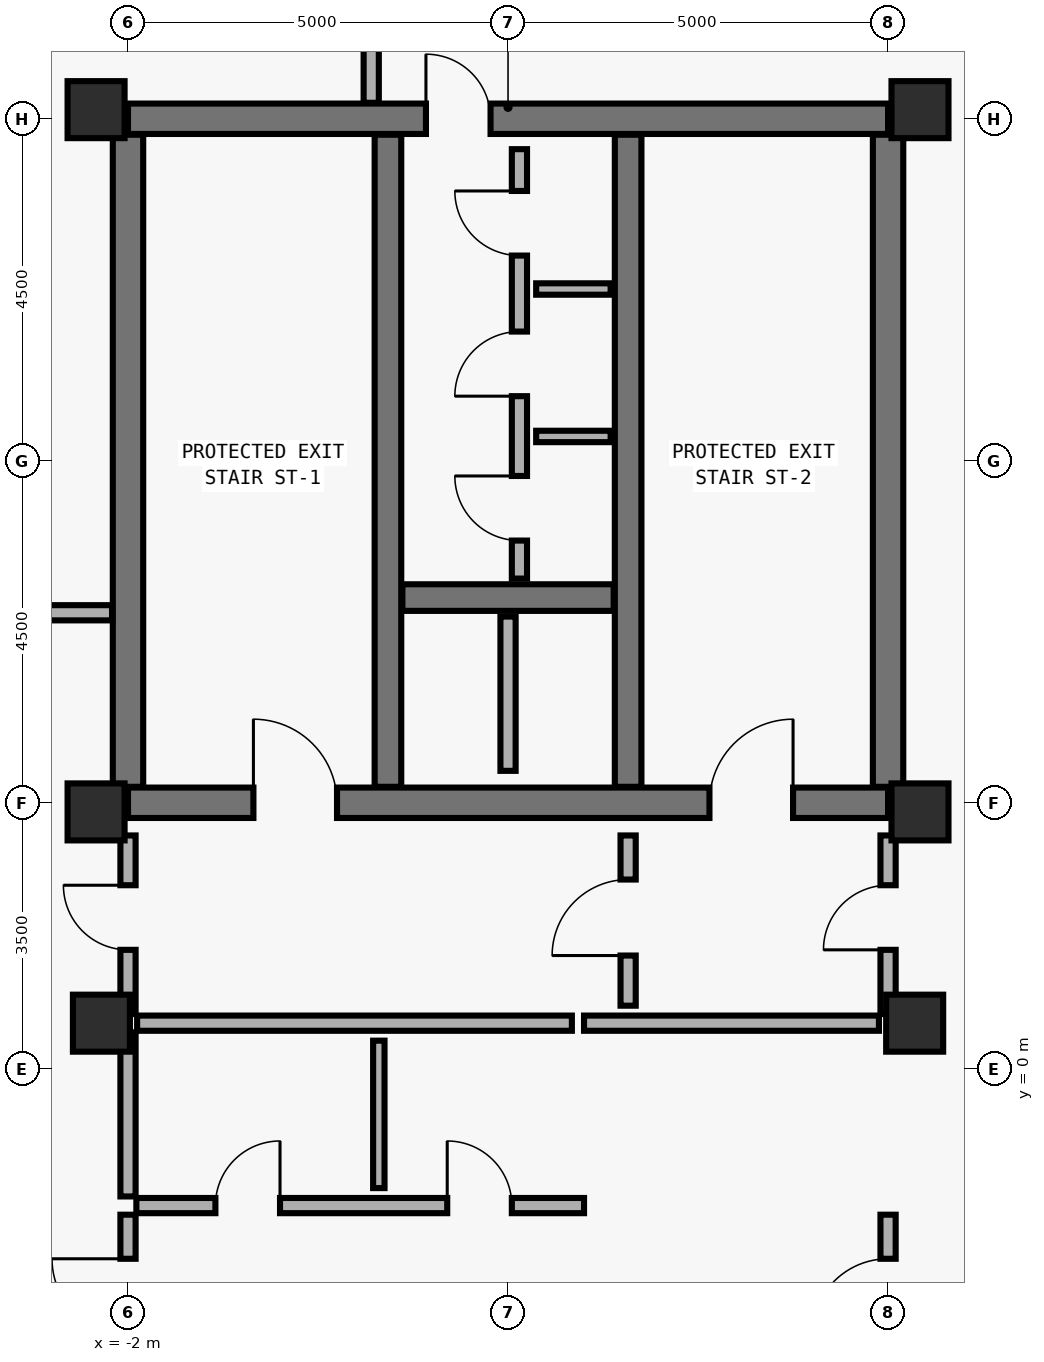
"""IFC4 building model, lengths in metres.
Left out: names, types, materials, properties, quantities, classifications, styles, units other than length and angle.
Written with IfcOpenShell. Run it as: python <this file> out.ifc"""

import sys

from ifc_helpers import new_model, si_unit, direction, frame, frame_2d, origin, origin_2d, place, context, subcontext, project, spatial, rectangle, extrude, element, fill, save


model = new_model("IFC4")
c1 = context("Model", 3, precision=1e-05, world=origin(), true_north=direction((0.0, 1.0)))
c2 = subcontext(c1, "Body", "Model", "MODEL_VIEW")
j1 = project(units=[si_unit("LENGTHUNIT", "METRE"), si_unit("PLANEANGLEUNIT", "RADIAN")], contexts=[c1])
p1 = place(None, origin())
s1 = spatial("IfcSite", under=j1, at=p1, CompositionType="ELEMENT")
p2 = place(p1, origin())
s2 = spatial("IfcBuilding", under=s1, at=p2, CompositionType="ELEMENT")
p3 = place(p2, frame((0.0, 0.0, 294.0)))
s3 = spatial("IfcBuildingStorey", under=s2, at=p3, CompositionType="ELEMENT", Elevation=294.0)
p4 = place(p3, frame((-2.0, 3.5, 0.0), z_axis=(0.0, 0.0, 1.0), x_axis=(1.0, 0.0, 0.0)))
e1 = element("IfcWall", 1, at=p4, inside=s3, PredefinedType="SHEAR", context=c2, shape_type="SweptSolid", body=[
    extrude(rectangle(XDim=10.0, YDim=0.4, at=frame_2d((5.0, 0.0))), origin(), (0.0, 0.0, 1.0), 4.192),
])
p5 = place(p4, frame((1.65, 0.0, 0.0)))
e2 = element("IfcOpeningElement", 2, at=p5, cuts=e1, PredefinedType="OPENING", context=c2, shape_type="SweptSolid", body=[
    extrude(rectangle(XDim=1.1, YDim=2.15, at=frame_2d((0.55, 1.075))), frame((0.0, 0.21, 0.0), z_axis=(0.0, -1.0, 0.0), x_axis=(1.0, 0.0, 0.0)), (0.0, 0.0, 1.0), 0.42),
])
p6 = place(p4, frame((7.65, 0.0, 0.0)))
e3 = element("IfcOpeningElement", 3, at=p6, cuts=e1, PredefinedType="OPENING", context=c2, shape_type="SweptSolid", body=[
    extrude(rectangle(XDim=1.1, YDim=2.15, at=frame_2d((0.55, 1.075))), frame((0.0, 0.21, 0.0), z_axis=(0.0, -1.0, 0.0), x_axis=(1.0, 0.0, 0.0)), (0.0, 0.0, 1.0), 0.42),
])
p7 = place(p3, frame((-2.0, 12.5, 0.0), z_axis=(0.0, 0.0, 1.0), x_axis=(1.0, 0.0, 0.0)))
e4 = element("IfcWall", 4, at=p7, inside=s3, PredefinedType="SHEAR", context=c2, shape_type="SweptSolid", body=[
    extrude(rectangle(XDim=10.0, YDim=0.4, at=frame_2d((5.0, 0.0))), origin(), (0.0, 0.0, 1.0), 4.192),
])
p8 = place(p7, frame((3.92, 0.0, 0.0)))
e5 = element("IfcOpeningElement", 5, at=p8, cuts=e4, PredefinedType="OPENING", context=c2, shape_type="SweptSolid", body=[
    extrude(rectangle(XDim=0.85, YDim=2.1, at=frame_2d((0.425, 1.05))), frame((0.0, 0.21, 0.0), z_axis=(0.0, -1.0, 0.0), x_axis=(1.0, 0.0, 0.0)), (0.0, 0.0, 1.0), 0.42),
])
for number, where, z_axis, x_axis in (
    (6, (-2.0, 3.71, 0.0), (0.0, 0.0, 1.0), (0.0, 1.0, 0.0)),
    (7, (8.0, 3.71, 0.0), (0.0, 0.0, 1.0), (0.0, 1.0, 0.0)),
):
    element("IfcWall", number, at=place(p3, frame(where, z_axis=z_axis, x_axis=x_axis)), inside=s3, PredefinedType="SHEAR", context=c2, shape_type="SweptSolid", body=[
        extrude(rectangle(XDim=8.58, YDim=0.4, at=frame_2d((4.29, 0.0))), origin(), (0.0, 0.0, 1.0), 4.192),
    ])
for number, where, z_axis, x_axis in (
    (8, (1.42, 3.71, 0.0), (0.0, 0.0, 1.0), (0.0, 1.0, 0.0)),
    (9, (4.58, 3.71, 0.0), (0.0, 0.0, 1.0), (0.0, 1.0, 0.0)),
):
    element("IfcWall", number, at=place(p3, frame(where, z_axis=z_axis, x_axis=x_axis)), inside=s3, PredefinedType="SHEAR", context=c2, shape_type="SweptSolid", body=[
        extrude(rectangle(XDim=8.58, YDim=0.35, at=frame_2d((4.29, 0.0))), origin(), (0.0, 0.0, 1.0), 4.192),
    ])
p9 = place(p3, frame((1.61, 6.2, 0.0), z_axis=(0.0, 0.0, 1.0), x_axis=(1.0, 0.0, 0.0)))
e10 = element("IfcWall", 10, at=p9, inside=s3, PredefinedType="SHEAR", context=c2, shape_type="SweptSolid", body=[
    extrude(rectangle(XDim=2.78, YDim=0.35, at=frame_2d((1.39, 0.0))), origin(), (0.0, 0.0, 1.0), 4.192),
])
for number, where, z_axis, x_axis in (
    (11, (-2.42, 12.62, 0.0), (0.0, 0.0, 1.0), (1.0, 0.0, 0.0)),
    (12, (8.42, 12.62, 0.0), (0.0, 0.0, 1.0), (1.0, 0.0, 0.0)),
    (13, (-2.42, 3.38, 0.0), (0.0, 0.0, 1.0), (1.0, 0.0, 0.0)),
    (14, (8.42, 3.38, 0.0), (0.0, 0.0, 1.0), (1.0, 0.0, 0.0)),
    (15, (-2.35, 0.6, 0.0), (0.0, 0.0, 1.0), (1.0, 0.0, 0.0)),
    (16, (8.35, 0.6, 0.0), (0.0, 0.0, 1.0), (1.0, 0.0, 0.0)),
):
    element("IfcColumn", number, at=place(p3, frame(where, z_axis=z_axis, x_axis=x_axis)), inside=s3, PredefinedType="COLUMN", context=c2, shape_type="SweptSolid", body=[
        extrude(rectangle(XDim=0.75, YDim=0.75, at=origin_2d()), origin(), (0.0, 0.0, 1.0), 4.175),
    ])
p10 = place(p3, frame((3.0, 3.92, 0.0), z_axis=(0.0, 0.0, 1.0), x_axis=(0.0, 1.0, 0.0)))
e17 = element("IfcWall", 17, at=p10, inside=s3, PredefinedType="SOLIDWALL", context=c2, shape_type="SweptSolid", body=[
    extrude(rectangle(XDim=2.03, YDim=0.2, at=frame_2d((1.015, 0.0))), origin(), (0.0, 0.0, 1.0), 3.96),
])
p11 = place(p3, frame((4.0, 0.6, 0.0), z_axis=(0.0, 0.0, 1.0), x_axis=(1.0, 0.0, 0.0)))
e18 = element("IfcWall", 18, at=p11, inside=s3, PredefinedType="SOLIDWALL", context=c2, shape_type="SweptSolid", body=[
    extrude(rectangle(XDim=3.88, YDim=0.2, at=frame_2d((1.94, 0.0))), origin(), (0.0, 0.0, 1.0), 3.672),
])
p12 = place(p3, frame((3.15, 6.45, 0.0), z_axis=(0.0, 0.0, 1.0), x_axis=(0.0, 1.0, 0.0)))
e19 = element("IfcWall", 19, at=p12, inside=s3, PredefinedType="MOVABLE", context=c2, shape_type="SweptSolid", body=[
    extrude(rectangle(XDim=5.65, YDim=0.2, at=frame_2d((2.825, 0.0))), origin(), (0.0, 0.0, 1.0), 3.96),
])
p13 = place(p12, frame((0.5, 0.0, 0.0)))
e20 = element("IfcOpeningElement", 20, at=p13, cuts=e19, PredefinedType="OPENING", context=c2, shape_type="SweptSolid", body=[
    extrude(rectangle(XDim=0.85, YDim=2.1, at=frame_2d((0.425, 1.05))), frame((0.0, 0.11, 0.0), z_axis=(0.0, -1.0, 0.0), x_axis=(1.0, 0.0, 0.0)), (0.0, 0.0, 1.0), 0.22),
])
p14 = place(p12, frame((2.4, 0.0, 0.0)))
e21 = element("IfcOpeningElement", 21, at=p14, cuts=e19, PredefinedType="OPENING", context=c2, shape_type="SweptSolid", body=[
    extrude(rectangle(XDim=0.85, YDim=2.1, at=frame_2d((0.425, 1.05))), frame((0.0, 0.11, 0.0), z_axis=(0.0, -1.0, 0.0), x_axis=(1.0, 0.0, 0.0)), (0.0, 0.0, 1.0), 0.22),
])
p15 = place(p12, frame((4.25, 0.0, 0.0)))
e22 = element("IfcOpeningElement", 22, at=p15, cuts=e19, PredefinedType="OPENING", context=c2, shape_type="SweptSolid", body=[
    extrude(rectangle(XDim=0.85, YDim=2.1, at=frame_2d((0.425, 1.05))), frame((0.0, 0.11, 0.0), z_axis=(0.0, -1.0, 0.0), x_axis=(1.0, 0.0, 0.0)), (0.0, 0.0, 1.0), 0.22),
])
p16 = place(p3, frame((4.58, 0.83, 0.0), z_axis=(0.0, 0.0, 1.0), x_axis=(0.0, 1.0, 0.0)))
e23 = element("IfcWall", 23, at=p16, inside=s3, PredefinedType="MOVABLE", context=c2, shape_type="SweptSolid", body=[
    extrude(rectangle(XDim=2.24, YDim=0.2, at=frame_2d((1.12, 0.0))), origin(), (0.0, 0.0, 1.0), 3.96),
])
p17 = place(p16, frame((0.66, 0.0, 0.0)))
e24 = element("IfcOpeningElement", 24, at=p17, cuts=e23, PredefinedType="OPENING", context=c2, shape_type="SweptSolid", body=[
    extrude(rectangle(XDim=1.0, YDim=2.1, at=frame_2d((0.5, 1.05))), frame((0.0, 0.11, 0.0), z_axis=(0.0, -1.0, 0.0), x_axis=(1.0, 0.0, 0.0)), (0.0, 0.0, 1.0), 0.22),
])
p18 = place(p3, frame((-2.0, 0.72, 0.0), z_axis=(0.0, 0.0, 1.0), x_axis=(0.0, 1.0, 0.0)))
e25 = element("IfcWall", 25, at=p18, inside=s3, PredefinedType="MOVABLE", context=c2, shape_type="SweptSolid", body=[
    extrude(rectangle(XDim=2.35, YDim=0.2, at=frame_2d((1.175, 0.0))), origin(), (0.0, 0.0, 1.0), 3.292),
])
p19 = place(p18, frame((0.845, 0.0, 0.0)))
e26 = element("IfcOpeningElement", 26, at=p19, cuts=e25, PredefinedType="OPENING", context=c2, shape_type="SweptSolid", body=[
    extrude(rectangle(XDim=0.85, YDim=2.1, at=frame_2d((0.425, 1.05))), frame((0.0, 0.11, 0.0), z_axis=(0.0, -1.0, 0.0), x_axis=(1.0, 0.0, 0.0)), (0.0, 0.0, 1.0), 0.22),
])
p20 = place(p3, frame((8.0, 0.72, 0.0), z_axis=(0.0, 0.0, 1.0), x_axis=(0.0, 1.0, 0.0)))
e27 = element("IfcWall", 27, at=p20, inside=s3, PredefinedType="MOVABLE", context=c2, shape_type="SweptSolid", body=[
    extrude(rectangle(XDim=2.35, YDim=0.2, at=frame_2d((1.175, 0.0))), origin(), (0.0, 0.0, 1.0), 3.292),
])
p21 = place(p20, frame((0.845, 0.0, 0.0)))
e28 = element("IfcOpeningElement", 28, at=p21, cuts=e27, PredefinedType="OPENING", context=c2, shape_type="SweptSolid", body=[
    extrude(rectangle(XDim=0.85, YDim=2.1, at=frame_2d((0.425, 1.05))), frame((0.0, 0.11, 0.0), z_axis=(0.0, -1.0, 0.0), x_axis=(1.0, 0.0, 0.0)), (0.0, 0.0, 1.0), 0.22),
])
p22 = place(p3, frame((-2.0, -4.08, 0.0), z_axis=(0.0, 0.0, 1.0), x_axis=(0.0, 1.0, 0.0)))
e29 = element("IfcWall", 29, at=p22, inside=s3, PredefinedType="MOVABLE", context=c2, shape_type="SweptSolid", body=[
    extrude(rectangle(XDim=2.16, YDim=0.2, at=frame_2d((1.08, 0.0))), origin(), (0.0, 0.0, 1.0), 3.672),
])
p23 = place(p22, frame((0.58, 0.0, 0.0)))
e30 = element("IfcOpeningElement", 30, at=p23, cuts=e29, PredefinedType="OPENING", context=c2, shape_type="SweptSolid", body=[
    extrude(rectangle(XDim=1.0, YDim=2.1, at=frame_2d((0.5, 1.05))), frame((0.0, 0.11, 0.0), z_axis=(0.0, -1.0, 0.0), x_axis=(1.0, 0.0, 0.0)), (0.0, 0.0, 1.0), 0.22),
])
p24 = place(p3, frame((8.0, -3.97, 0.0), z_axis=(0.0, 0.0, 1.0), x_axis=(0.0, 1.0, 0.0)))
e31 = element("IfcWall", 31, at=p24, inside=s3, PredefinedType="MOVABLE", context=c2, shape_type="SweptSolid", body=[
    extrude(rectangle(XDim=2.05, YDim=0.2, at=frame_2d((1.025, 0.0))), origin(), (0.0, 0.0, 1.0), 3.672),
])
p25 = place(p24, frame((0.47, 0.0, 0.0)))
e32 = element("IfcOpeningElement", 32, at=p25, cuts=e31, PredefinedType="OPENING", context=c2, shape_type="SweptSolid", body=[
    extrude(rectangle(XDim=1.0, YDim=2.1, at=frame_2d((0.5, 1.05))), frame((0.0, 0.11, 0.0), z_axis=(0.0, -1.0, 0.0), x_axis=(1.0, 0.0, 0.0)), (0.0, 0.0, 1.0), 0.22),
])
p26 = place(p3, frame((-1.89, -1.8, 0.0), z_axis=(0.0, 0.0, 1.0), x_axis=(1.0, 0.0, 0.0)))
e33 = element("IfcWall", 33, at=p26, inside=s3, PredefinedType="MOVABLE", context=c2, shape_type="SweptSolid", body=[
    extrude(rectangle(XDim=5.89, YDim=0.2, at=frame_2d((2.945, 0.0))), origin(), (0.0, 0.0, 1.0), 3.96),
])
p27 = place(p26, frame((1.04, 0.0, 0.0)))
e34 = element("IfcOpeningElement", 34, at=p27, cuts=e33, PredefinedType="OPENING", context=c2, shape_type="SweptSolid", body=[
    extrude(rectangle(XDim=0.85, YDim=2.1, at=frame_2d((0.425, 1.05))), frame((0.0, 0.11, 0.0), z_axis=(0.0, -1.0, 0.0), x_axis=(1.0, 0.0, 0.0)), (0.0, 0.0, 1.0), 0.22),
])
p28 = place(p26, frame((4.09, 0.0, 0.0)))
e35 = element("IfcOpeningElement", 35, at=p28, cuts=e33, PredefinedType="OPENING", context=c2, shape_type="SweptSolid", body=[
    extrude(rectangle(XDim=0.85, YDim=2.1, at=frame_2d((0.425, 1.05))), frame((0.0, 0.11, 0.0), z_axis=(0.0, -1.0, 0.0), x_axis=(1.0, 0.0, 0.0)), (0.0, 0.0, 1.0), 0.22),
])
for number, where, z_axis, x_axis in (
    (36, (3.37, 8.32, 0.0), (0.0, 0.0, 1.0), (1.0, 0.0, 0.0)),
    (37, (3.37, 10.26, 0.0), (0.0, 0.0, 1.0), (1.0, 0.0, 0.0)),
):
    element("IfcWall", number, at=place(p3, frame(where, z_axis=z_axis, x_axis=x_axis)), inside=s3, PredefinedType="PARTITIONING", context=c2, shape_type="SweptSolid", body=[
        extrude(rectangle(XDim=0.98, YDim=0.15, at=frame_2d((0.49, 0.0))), origin(), (0.0, 0.0, 1.0), 3.96),
    ])
p29 = place(p3, frame((-1.88, 0.6, 0.0), z_axis=(0.0, 0.0, 1.0), x_axis=(1.0, 0.0, 0.0)))
e38 = element("IfcWall", 38, at=p29, inside=s3, PredefinedType="MOVABLE", context=c2, shape_type="SweptSolid", body=[
    extrude(rectangle(XDim=5.72, YDim=0.2, at=frame_2d((2.86, 0.0))), origin(), (0.0, 0.0, 1.0), 3.672),
])
p30 = place(p3, frame((1.3, -1.57, 0.0), z_axis=(0.0, 0.0, 1.0), x_axis=(0.0, 1.0, 0.0)))
e39 = element("IfcWall", 39, at=p30, inside=s3, PredefinedType="PARTITIONING", context=c2, shape_type="SweptSolid", body=[
    extrude(rectangle(XDim=1.94, YDim=0.15, at=frame_2d((0.97, 0.0))), origin(), (0.0, 0.0, 1.0), 3.96),
])
p31 = place(p3, frame((-2.0, -1.68, 0.0), z_axis=(0.0, 0.0, 1.0), x_axis=(0.0, 1.0, 0.0)))
e40 = element("IfcWall", 40, at=p31, inside=s3, PredefinedType="MOVABLE", context=c2, shape_type="SweptSolid", body=[
    extrude(rectangle(XDim=2.16, YDim=0.2, at=frame_2d((1.08, 0.0))), origin(), (0.0, 0.0, 1.0), 3.672),
])
p32 = place(p3, frame((-2.21, 6.0, 0.0), z_axis=(0.0, 0.0, 1.0), x_axis=(-1.0, 0.0, 0.0)))
e41 = element("IfcWall", 41, at=p32, inside=s3, PredefinedType="MOVABLE", context=c2, shape_type="SweptSolid", body=[
    extrude(rectangle(XDim=2.28, YDim=0.2, at=frame_2d((1.14, 0.0))), origin(), (0.0, 0.0, 1.0), 3.96),
])
p33 = place(p3, frame((1.2, 14.49, 0.0), z_axis=(0.0, 0.0, 1.0), x_axis=(0.0, -1.0, 0.0)))
e42 = element("IfcWall", 42, at=p33, inside=s3, PredefinedType="MOVABLE", context=c2, shape_type="SweptSolid", body=[
    extrude(rectangle(XDim=1.78, YDim=0.2, at=frame_2d((0.89, 0.0))), origin(), (0.0, 0.0, 1.0), 3.96),
])
p34 = place(p5, origin())
e43 = element("IfcDoor", 43, at=p34, inside=s3, OperationType="SINGLE_SWING_LEFT", PredefinedType="DOOR", context=c2, shape_type="SweptSolid", body=[
    extrude(rectangle(XDim=1.1, YDim=2.15, at=frame_2d((0.55, 1.075))), frame((0.0, 0.025, 0.0), z_axis=(0.0, -1.0, 0.0), x_axis=(1.0, 0.0, 0.0)), (0.0, 0.0, 1.0), 0.05),
])
fill(e2, e43)
p35 = place(p6, origin())
e44 = element("IfcDoor", 44, at=p35, inside=s3, OperationType="SINGLE_SWING_RIGHT", PredefinedType="DOOR", context=c2, shape_type="SweptSolid", body=[
    extrude(rectangle(XDim=1.1, YDim=2.15, at=frame_2d((0.55, 1.075))), frame((0.0, 0.025, 0.0), z_axis=(0.0, -1.0, 0.0), x_axis=(1.0, 0.0, 0.0)), (0.0, 0.0, 1.0), 0.05),
])
fill(e3, e44)
p36 = place(p8, origin())
e45 = element("IfcDoor", 45, at=p36, inside=s3, OperationType="SINGLE_SWING_LEFT", PredefinedType="DOOR", context=c2, shape_type="SweptSolid", body=[
    extrude(rectangle(XDim=0.85, YDim=2.1, at=frame_2d((0.425, 1.05))), frame((0.0, 0.025, 0.0), z_axis=(0.0, -1.0, 0.0), x_axis=(1.0, 0.0, 0.0)), (0.0, 0.0, 1.0), 0.05),
])
fill(e5, e45)
p37 = place(p13, origin())
e46 = element("IfcDoor", 46, at=p37, inside=s3, OperationType="SINGLE_SWING_RIGHT", PredefinedType="DOOR", context=c2, shape_type="SweptSolid", body=[
    extrude(rectangle(XDim=0.85, YDim=2.1, at=frame_2d((0.425, 1.05))), frame((0.0, 0.025, 0.0), z_axis=(0.0, -1.0, 0.0), x_axis=(1.0, 0.0, 0.0)), (0.0, 0.0, 1.0), 0.05),
])
fill(e20, e46)
p38 = place(p14, origin())
e47 = element("IfcDoor", 47, at=p38, inside=s3, OperationType="SINGLE_SWING_LEFT", PredefinedType="DOOR", context=c2, shape_type="SweptSolid", body=[
    extrude(rectangle(XDim=0.85, YDim=2.1, at=frame_2d((0.425, 1.05))), frame((0.0, 0.025, 0.0), z_axis=(0.0, -1.0, 0.0), x_axis=(1.0, 0.0, 0.0)), (0.0, 0.0, 1.0), 0.05),
])
fill(e21, e47)
p39 = place(p15, origin())
e48 = element("IfcDoor", 48, at=p39, inside=s3, OperationType="SINGLE_SWING_RIGHT", PredefinedType="DOOR", context=c2, shape_type="SweptSolid", body=[
    extrude(rectangle(XDim=0.85, YDim=2.1, at=frame_2d((0.425, 1.05))), frame((0.0, 0.025, 0.0), z_axis=(0.0, -1.0, 0.0), x_axis=(1.0, 0.0, 0.0)), (0.0, 0.0, 1.0), 0.05),
])
fill(e22, e48)
p40 = place(p17, origin())
e49 = element("IfcDoor", 49, at=p40, inside=s3, OperationType="SINGLE_SWING_LEFT", PredefinedType="DOOR", context=c2, shape_type="SweptSolid", body=[
    extrude(rectangle(XDim=1.0, YDim=2.1, at=frame_2d((0.5, 1.05))), frame((0.0, 0.025, 0.0), z_axis=(0.0, -1.0, 0.0), x_axis=(1.0, 0.0, 0.0)), (0.0, 0.0, 1.0), 0.05),
])
fill(e24, e49)
p41 = place(p19, origin())
e50 = element("IfcDoor", 50, at=p41, inside=s3, OperationType="SINGLE_SWING_RIGHT", PredefinedType="DOOR", context=c2, shape_type="SweptSolid", body=[
    extrude(rectangle(XDim=0.85, YDim=2.1, at=frame_2d((0.425, 1.05))), frame((0.0, 0.025, 0.0), z_axis=(0.0, -1.0, 0.0), x_axis=(1.0, 0.0, 0.0)), (0.0, 0.0, 1.0), 0.05),
])
fill(e26, e50)
p42 = place(p21, origin())
e51 = element("IfcDoor", 51, at=p42, inside=s3, OperationType="SINGLE_SWING_LEFT", PredefinedType="DOOR", context=c2, shape_type="SweptSolid", body=[
    extrude(rectangle(XDim=0.85, YDim=2.1, at=frame_2d((0.425, 1.05))), frame((0.0, 0.025, 0.0), z_axis=(0.0, -1.0, 0.0), x_axis=(1.0, 0.0, 0.0)), (0.0, 0.0, 1.0), 0.05),
])
fill(e28, e51)
p43 = place(p23, origin())
e52 = element("IfcDoor", 52, at=p43, inside=s3, OperationType="SINGLE_SWING_RIGHT", PredefinedType="DOOR", context=c2, shape_type="SweptSolid", body=[
    extrude(rectangle(XDim=1.0, YDim=2.1, at=frame_2d((0.5, 1.05))), frame((0.0, 0.025, 0.0), z_axis=(0.0, -1.0, 0.0), x_axis=(1.0, 0.0, 0.0)), (0.0, 0.0, 1.0), 0.05),
])
fill(e30, e52)
p44 = place(p25, origin())
e53 = element("IfcDoor", 53, at=p44, inside=s3, OperationType="SINGLE_SWING_LEFT", PredefinedType="DOOR", context=c2, shape_type="SweptSolid", body=[
    extrude(rectangle(XDim=1.0, YDim=2.1, at=frame_2d((0.5, 1.05))), frame((0.0, 0.025, 0.0), z_axis=(0.0, -1.0, 0.0), x_axis=(1.0, 0.0, 0.0)), (0.0, 0.0, 1.0), 0.05),
])
fill(e32, e53)
p45 = place(p27, origin())
e54 = element("IfcDoor", 54, at=p45, inside=s3, OperationType="SINGLE_SWING_RIGHT", PredefinedType="DOOR", context=c2, shape_type="SweptSolid", body=[
    extrude(rectangle(XDim=0.85, YDim=2.1, at=frame_2d((0.425, 1.05))), frame((0.0, 0.025, 0.0), z_axis=(0.0, -1.0, 0.0), x_axis=(1.0, 0.0, 0.0)), (0.0, 0.0, 1.0), 0.05),
])
fill(e34, e54)
p46 = place(p28, origin())
e55 = element("IfcDoor", 55, at=p46, inside=s3, OperationType="SINGLE_SWING_LEFT", PredefinedType="DOOR", context=c2, shape_type="SweptSolid", body=[
    extrude(rectangle(XDim=0.85, YDim=2.1, at=frame_2d((0.425, 1.05))), frame((0.0, 0.025, 0.0), z_axis=(0.0, -1.0, 0.0), x_axis=(1.0, 0.0, 0.0)), (0.0, 0.0, 1.0), 0.05),
])
fill(e35, e55)
save(model, sys.argv[1])
